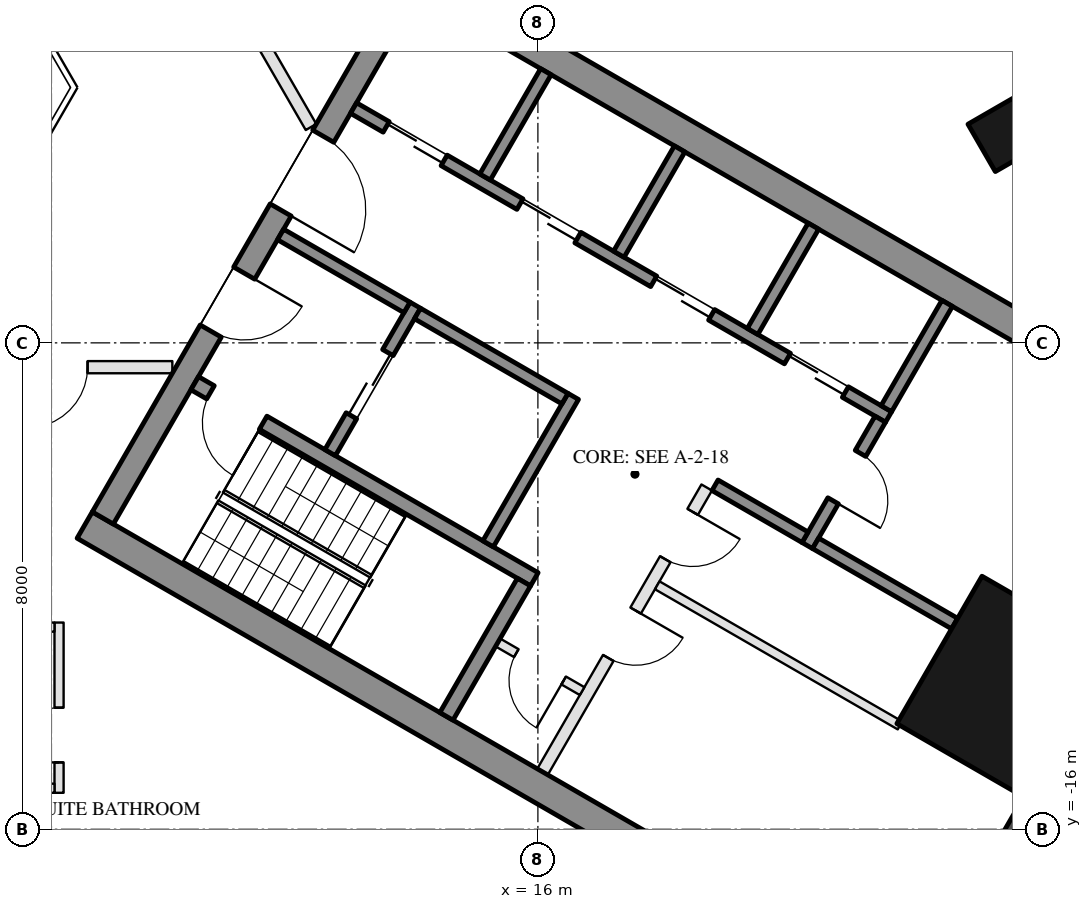
"""IFC4 building model, lengths in metres.
Left out: names, types, materials, properties, quantities, classifications, styles, units other than length and angle.
Written with IfcOpenShell. Run it as: python <this file> out.ifc"""

import sys

from ifc_helpers import new_model, si_unit, direction, frame, frame_2d, origin, origin_2d, place, context, subcontext, project, spatial, rectangle, hollow_rectangle, extrude, element, fill, save


model = new_model("IFC4")
c1 = context("Model", 3, precision=1e-05, world=origin(), true_north=direction((0.0, 1.0)))
c2 = subcontext(c1, "Body", "Model", "MODEL_VIEW")
j1 = project(units=[si_unit("LENGTHUNIT", "METRE"), si_unit("PLANEANGLEUNIT", "RADIAN")], contexts=[c1])
p1 = place(None, origin())
s1 = spatial("IfcSite", under=j1, at=p1, CompositionType="ELEMENT")
p2 = place(p1, origin())
s2 = spatial("IfcBuilding", under=s1, at=p2, CompositionType="ELEMENT")
p3 = place(p2, frame((0.0, 0.0, 87.2)))
s3 = spatial("IfcBuildingStorey", under=s2, at=p3, CompositionType="ELEMENT", Elevation=87.2)
p4 = place(p3, frame((23.688, -4.568, 0.0), z_axis=(0.0, 0.0, 1.0), x_axis=(-0.5, 0.866025403784, 0.0)))
e1 = element("IfcColumn", 1, at=p4, inside=s3, PredefinedType="COLUMN", context=c2, shape_type="SweptSolid", body=[
    extrude(hollow_rectangle(XDim=0.9, YDim=0.9, WallThickness=0.04, at=origin_2d()), origin(), (0.0, 0.0, 1.0), 3.7),
])
p5 = place(p3, frame((23.643, -13.65, 0.0), z_axis=(0.0, 0.0, 1.0), x_axis=(0.5, 0.866025403784, 0.0)))
e2 = element("IfcColumn", 2, at=p5, inside=s3, PredefinedType="COLUMN", context=c2, shape_type="SweptSolid", body=[
    extrude(hollow_rectangle(XDim=2.8, YDim=2.4, WallThickness=0.07, at=origin_2d()), origin(), (0.0, 0.0, 1.0), 3.7),
])
p6 = place(p3, frame((23.427, -16.792, 0.0), z_axis=(0.0, 0.0, 1.0), x_axis=(0.500018773155, 0.866014564827, 0.0)))
e3 = element("IfcWall", 3, at=p6, inside=s3, PredefinedType="SOLIDWALL", context=c2, shape_type="SweptSolid", body=[
    extrude(rectangle(XDim=5.658, YDim=0.35, at=frame_2d((2.829, 0.0))), origin(), (0.0, 0.0, 1.0), 3.55),
])
p7 = place(p3, frame((26.257, -6.567, 0.0), z_axis=(0.0, 0.0, 1.0), x_axis=(-0.500023526245, 0.866011820475, 0.0)))
e4 = element("IfcWall", 4, at=p7, inside=s3, PredefinedType="SOLIDWALL", context=c2, shape_type="SweptSolid", body=[
    extrude(rectangle(XDim=11.816, YDim=0.35, at=frame_2d((5.908, 0.0))), origin(), (0.0, 0.0, 1.0), 3.55),
])
p8 = place(p7, frame((0.38, 0.0, 0.3)))
e5 = element("IfcOpeningElement", 5, at=p8, cuts=e4, PredefinedType="OPENING", context=c2, shape_type="SweptSolid", body=[
    extrude(rectangle(XDim=1.8, YDim=2.65, at=frame_2d((0.9, 1.325))), frame((0.0, 0.185, 0.0), z_axis=(0.0, -1.0, 0.0), x_axis=(1.0, 0.0, 0.0)), (0.0, 0.0, 1.0), 0.37),
])
p9 = place(p7, frame((7.716, 0.0, 0.0)))
e6 = element("IfcOpeningElement", 6, at=p9, cuts=e4, PredefinedType="OPENING", context=c2, shape_type="SweptSolid", body=[
    extrude(rectangle(XDim=2.4, YDim=2.4, at=frame_2d((1.2, 1.2))), frame((0.0, 0.185, 0.0), z_axis=(0.0, -1.0, 0.0), x_axis=(1.0, 0.0, 0.0)), (0.0, 0.0, 1.0), 0.37),
])
p10 = place(p7, frame((3.816, 0.0, 0.3)))
e7 = element("IfcOpeningElement", 7, at=p10, cuts=e4, PredefinedType="OPENING", context=c2, shape_type="SweptSolid", body=[
    extrude(rectangle(XDim=1.6, YDim=2.65, at=frame_2d((0.8, 1.325))), frame((0.0, 0.185, 0.0), z_axis=(0.0, -1.0, 0.0), x_axis=(1.0, 0.0, 0.0)), (0.0, 0.0, 1.0), 0.37),
])
p11 = place(p7, frame((5.716, 0.0, 0.3)))
e8 = element("IfcOpeningElement", 8, at=p11, cuts=e4, PredefinedType="OPENING", context=c2, shape_type="SweptSolid", body=[
    extrude(rectangle(XDim=1.6, YDim=2.65, at=frame_2d((0.8, 1.325))), frame((0.0, 0.185, 0.0), z_axis=(0.0, -1.0, 0.0), x_axis=(1.0, 0.0, 0.0)), (0.0, 0.0, 1.0), 0.37),
])
for number, where, z_axis, x_axis in (
    (9, (8.547, -10.997, 0.0), (0.0, 0.0, 1.0), (0.866, -0.5, 0.0)),
    (10, (13.797, -1.903, 0.0), (0.0, 0.0, 1.0), (0.866, -0.5, 0.0)),
):
    element("IfcWall", number, at=place(p3, frame(where, z_axis=z_axis, x_axis=x_axis)), inside=s3, PredefinedType="SHEAR", context=c2, shape_type="SweptSolid", body=[
        extrude(rectangle(XDim=14.837, YDim=0.5, at=frame_2d((7.418, 0.0))), origin(), (0.0, 0.0, 1.0), 3.5),
    ])
p12 = place(p3, frame((8.845, -10.88, 0.0), z_axis=(0.0, 0.0, 1.0), x_axis=(0.500004234368, 0.866022959057, 0.0)))
e11 = element("IfcWall", 11, at=p12, inside=s3, PredefinedType="SHEAR", context=c2, shape_type="SweptSolid", body=[
    extrude(rectangle(XDim=10.0, YDim=0.4, at=frame_2d((5.0, 0.0))), origin(), (0.0, 0.0, 1.0), 3.5),
])
p13 = place(p12, frame((3.55, 0.0, 0.0)))
e12 = element("IfcOpeningElement", 12, at=p13, cuts=e11, PredefinedType="OPENING", context=c2, shape_type="SweptSolid", body=[
    extrude(rectangle(XDim=1.1, YDim=2.1, at=frame_2d((0.55, 1.05))), frame((0.0, 0.21, 0.0), z_axis=(0.0, -1.0, 0.0), x_axis=(1.0, 0.0, 0.0)), (0.0, 0.0, 1.0), 0.42),
])
p14 = place(p12, frame((5.85, 0.0, 0.0)))
e13 = element("IfcOpeningElement", 13, at=p14, cuts=e11, PredefinedType="OPENING", context=c2, shape_type="SweptSolid", body=[
    extrude(rectangle(XDim=1.4, YDim=2.1, at=frame_2d((0.7, 1.05))), frame((0.0, 0.21, 0.0), z_axis=(0.0, -1.0, 0.0), x_axis=(1.0, 0.0, 0.0)), (0.0, 0.0, 1.0), 0.42),
])
p15 = place(p3, frame((10.356, -8.664, 0.0), z_axis=(0.0, 0.0, 1.0), x_axis=(0.866028629588, -0.499994412703, 0.0)))
e14 = element("IfcWall", 14, at=p15, inside=s3, PredefinedType="SHEAR", context=c2, shape_type="SweptSolid", body=[
    extrude(rectangle(XDim=6.45, YDim=0.25, at=frame_2d((3.225, 0.0))), origin(), (0.0, 0.0, 1.0), 3.5),
])
p16 = place(p15, frame((0.3, 0.0, 0.0)))
e15 = element("IfcOpeningElement", 15, at=p16, cuts=e14, PredefinedType="OPENING", context=c2, shape_type="SweptSolid", body=[
    extrude(rectangle(XDim=1.0, YDim=2.1, at=frame_2d((0.5, 1.05))), frame((0.0, 0.135, 0.0), z_axis=(0.0, -1.0, 0.0), x_axis=(1.0, 0.0, 0.0)), (0.0, 0.0, 1.0), 0.27),
])
p17 = place(p3, frame((14.496, -14.143, 0.0), z_axis=(0.0, 0.0, 1.0), x_axis=(0.500062241894, 0.865989465428, 0.0)))
e16 = element("IfcWall", 16, at=p17, inside=s3, PredefinedType="SHEAR", context=c2, shape_type="SweptSolid", body=[
    extrude(rectangle(XDim=2.55, YDim=0.25, at=frame_2d((1.275, 0.0))), origin(), (0.0, 0.0, 1.0), 3.5),
])
p18 = place(p3, frame((15.181, -11.305, 0.0), z_axis=(0.0, 0.0, 1.0), x_axis=(0.49994636267, 0.866056369097, 0.0)))
e17 = element("IfcWall", 17, at=p18, inside=s3, PredefinedType="SHEAR", context=c2, shape_type="SweptSolid", body=[
    extrude(rectangle(XDim=2.8, YDim=0.2, at=frame_2d((1.4, 0.0))), origin(), (0.0, 0.0, 1.0), 3.5),
])
p19 = place(p3, frame((12.583, -9.805, 0.0), z_axis=(0.0, 0.0, 1.0), x_axis=(0.49994636267, 0.866056369097, 0.0)))
e18 = element("IfcWall", 18, at=p19, inside=s3, PredefinedType="SHEAR", context=c2, shape_type="SweptSolid", body=[
    extrude(rectangle(XDim=2.8, YDim=0.2, at=frame_2d((1.4, 0.0))), origin(), (0.0, 0.0, 1.0), 3.5),
])
p20 = place(p19, frame((0.7, 0.0, 0.0)))
e19 = element("IfcOpeningElement", 19, at=p20, cuts=e18, PredefinedType="OPENING", context=c2, shape_type="SweptSolid", body=[
    extrude(rectangle(XDim=1.2, YDim=2.1, at=frame_2d((0.6, 1.05))), frame((0.0, 0.11, 0.0), z_axis=(0.0, -1.0, 0.0), x_axis=(1.0, 0.0, 0.0)), (0.0, 0.0, 1.0), 0.22),
])
p21 = place(p3, frame((11.768, -6.217, 0.0), z_axis=(0.0, 0.0, 1.0), x_axis=(0.866050077142, -0.499957262057, 0.0)))
e20 = element("IfcWall", 20, at=p21, inside=s3, PredefinedType="SHEAR", context=c2, shape_type="SweptSolid", body=[
    extrude(rectangle(XDim=2.4, YDim=0.2, at=frame_2d((1.2, 0.0))), origin(), (0.0, 0.0, 1.0), 3.5),
])
p22 = place(p3, frame((14.02, -7.517, 0.0), z_axis=(0.0, 0.0, 1.0), x_axis=(0.866034573852, -0.49998411664, 0.0)))
e21 = element("IfcWall", 21, at=p22, inside=s3, PredefinedType="SHEAR", context=c2, shape_type="SweptSolid", body=[
    extrude(rectangle(XDim=2.8, YDim=0.2, at=frame_2d((1.4, 0.0))), origin(), (0.0, 0.0, 1.0), 3.5),
])
p23 = place(p3, frame((12.968, -4.138, 0.0), z_axis=(0.0, 0.0, 1.0), x_axis=(0.866028328073, -0.49999493495, 0.0)))
e22 = element("IfcWall", 22, at=p23, inside=s3, PredefinedType="SHEAR", context=c2, shape_type="SweptSolid", body=[
    extrude(rectangle(XDim=10.16, YDim=0.2, at=frame_2d((5.08, 0.0))), origin(), (0.0, 0.0, 1.0), 3.5),
])
p24 = place(p23, frame((0.62, 0.0, 0.0)))
e23 = element("IfcOpeningElement", 23, at=p24, cuts=e22, PredefinedType="OPENING", context=c2, shape_type="SweptSolid", body=[
    extrude(rectangle(XDim=1.1, YDim=2.1, at=frame_2d((0.55, 1.05))), frame((0.0, 0.11, 0.0), z_axis=(0.0, -1.0, 0.0), x_axis=(1.0, 0.0, 0.0)), (0.0, 0.0, 1.0), 0.22),
])
p25 = place(p23, frame((3.16, 0.0, 0.0)))
e24 = element("IfcOpeningElement", 24, at=p25, cuts=e22, PredefinedType="OPENING", context=c2, shape_type="SweptSolid", body=[
    extrude(rectangle(XDim=1.1, YDim=2.1, at=frame_2d((0.55, 1.05))), frame((0.0, 0.11, 0.0), z_axis=(0.0, -1.0, 0.0), x_axis=(1.0, 0.0, 0.0)), (0.0, 0.0, 1.0), 0.22),
])
p26 = place(p23, frame((5.7, 0.0, 0.0)))
e25 = element("IfcOpeningElement", 25, at=p26, cuts=e22, PredefinedType="OPENING", context=c2, shape_type="SweptSolid", body=[
    extrude(rectangle(XDim=1.1, YDim=2.1, at=frame_2d((0.55, 1.05))), frame((0.0, 0.11, 0.0), z_axis=(0.0, -1.0, 0.0), x_axis=(1.0, 0.0, 0.0)), (0.0, 0.0, 1.0), 0.22),
])
p27 = place(p23, frame((8.24, 0.0, 0.0)))
e26 = element("IfcOpeningElement", 26, at=p27, cuts=e22, PredefinedType="OPENING", context=c2, shape_type="SweptSolid", body=[
    extrude(rectangle(XDim=1.1, YDim=2.1, at=frame_2d((0.55, 1.05))), frame((0.0, 0.11, 0.0), z_axis=(0.0, -1.0, 0.0), x_axis=(1.0, 0.0, 0.0)), (0.0, 0.0, 1.0), 0.22),
])
p28 = place(p3, frame((20.43, -11.333, 0.0), z_axis=(0.0, 0.0, 1.0), x_axis=(0.500001309137, 0.866024647952, 0.0)))
e27 = element("IfcWall", 27, at=p28, inside=s3, PredefinedType="SHEAR", context=c2, shape_type="SweptSolid", body=[
    extrude(rectangle(XDim=2.4, YDim=0.2, at=frame_2d((1.2, 0.0))), origin(), (0.0, 0.0, 1.0), 3.5),
])
p29 = place(p28, frame((0.85, 0.0, 0.0)))
e28 = element("IfcOpeningElement", 28, at=p29, cuts=e27, PredefinedType="OPENING", context=c2, shape_type="SweptSolid", body=[
    extrude(rectangle(XDim=0.9, YDim=2.1, at=frame_2d((0.45, 1.05))), frame((0.0, 0.11, 0.0), z_axis=(0.0, -1.0, 0.0), x_axis=(1.0, 0.0, 0.0)), (0.0, 0.0, 1.0), 0.22),
])
p30 = place(p3, frame((18.913, -10.342, 0.0), z_axis=(0.0, 0.0, 1.0), x_axis=(0.866038183914, -0.499977863513, 0.0)))
e29 = element("IfcWall", 29, at=p30, inside=s3, PredefinedType="SHEAR", context=c2, shape_type="SweptSolid", body=[
    extrude(rectangle(XDim=1.71, YDim=0.2, at=frame_2d((0.855, 0.0))), origin(), (0.0, 0.0, 1.0), 3.5),
])
for number, where, z_axis, x_axis in (
    (30, (15.131, -5.272, 0.0), (0.0, 0.0, 1.0), (0.5, 0.866, 0.0)),
    (31, (17.331, -6.542, 0.0), (0.0, 0.0, 1.0), (0.5, 0.866, 0.0)),
    (32, (19.531, -7.812, 0.0), (0.0, 0.0, 1.0), (0.5, 0.866, 0.0)),
    (33, (21.73, -9.082, 0.0), (0.0, 0.0, 1.0), (0.5, 0.866, 0.0)),
):
    element("IfcWall", number, at=place(p3, frame(where, z_axis=z_axis, x_axis=x_axis)), inside=s3, PredefinedType="SHEAR", context=c2, shape_type="SweptSolid", body=[
        extrude(rectangle(XDim=2.0, YDim=0.2, at=frame_2d((1.0, 0.0))), origin(), (0.0, 0.0, 1.0), 3.5),
    ])
p31 = place(p3, frame((20.567, -11.297, 0.0), z_axis=(0.0, 0.0, 1.0), x_axis=(0.866060851709, -0.499938597367, 0.0)))
e34 = element("IfcWall", 34, at=p31, inside=s3, PredefinedType="SHEAR", context=c2, shape_type="SweptSolid", body=[
    extrude(rectangle(XDim=2.64, YDim=0.2, at=frame_2d((1.32, 0.0))), origin(), (0.0, 0.0, 1.0), 3.5),
])
p32 = place(p3, frame((16.076, -15.055, 0.0), z_axis=(0.0, 0.0, 1.0), x_axis=(0.499995103361, 0.866028230842, 0.0)))
e35 = element("IfcWall", 35, at=p32, inside=s3, PredefinedType="PARTITIONING", context=c2, shape_type="SweptSolid", body=[
    extrude(rectangle(XDim=5.4, YDim=0.2, at=frame_2d((2.7, 0.0))), origin(), (0.0, 0.0, 1.0), 3.5),
])
p33 = place(p32, frame((2.163, 0.0, 0.0)))
e36 = element("IfcOpeningElement", 36, at=p33, cuts=e35, PredefinedType="OPENING", context=c2, shape_type="SweptSolid", body=[
    extrude(rectangle(XDim=0.9, YDim=2.1, at=frame_2d((0.45, 1.05))), frame((0.0, 0.11, 0.0), z_axis=(0.0, -1.0, 0.0), x_axis=(1.0, 0.0, 0.0)), (0.0, 0.0, 1.0), 0.22),
])
p34 = place(p32, frame((4.038, 0.0, 0.0)))
e37 = element("IfcOpeningElement", 37, at=p34, cuts=e35, PredefinedType="OPENING", context=c2, shape_type="SweptSolid", body=[
    extrude(rectangle(XDim=0.9, YDim=2.1, at=frame_2d((0.45, 1.05))), frame((0.0, 0.11, 0.0), z_axis=(0.0, -1.0, 0.0), x_axis=(1.0, 0.0, 0.0)), (0.0, 0.0, 1.0), 0.22),
])
p35 = place(p3, frame((15.342, -12.928, 0.0), z_axis=(0.0, 0.0, 1.0), x_axis=(0.865989903783, -0.500061482766, 0.0)))
e38 = element("IfcWall", 38, at=p35, inside=s3, PredefinedType="PARTITIONING", context=c2, shape_type="SweptSolid", body=[
    extrude(rectangle(XDim=1.6, YDim=0.15, at=frame_2d((0.8, 0.0))), origin(), (0.0, 0.0, 1.0), 3.5),
])
p36 = place(p35, frame((0.35, 0.0, 0.0)))
e39 = element("IfcOpeningElement", 39, at=p36, cuts=e38, PredefinedType="OPENING", context=c2, shape_type="SweptSolid", body=[
    extrude(rectangle(XDim=0.9, YDim=2.1, at=frame_2d((0.45, 1.05))), frame((0.0, 0.085, 0.0), z_axis=(0.0, -1.0, 0.0), x_axis=(1.0, 0.0, 0.0)), (0.0, 0.0, 1.0), 0.17),
])
p37 = place(p3, frame((17.963, -11.987, 0.0), z_axis=(0.0, 0.0, 1.0), x_axis=(0.865998608524, -0.500046407882, 0.0)))
e40 = element("IfcWall", 40, at=p37, inside=s3, PredefinedType="PARTITIONING", context=c2, shape_type="SweptSolid", body=[
    extrude(rectangle(XDim=4.61, YDim=0.15, at=frame_2d((2.305, 0.0))), origin(), (0.0, 0.0, 1.0), 3.5),
])
p38 = place(p3, frame((9.988, -8.4, 0.0), z_axis=(0.0, 0.0, 1.0), x_axis=(-1.0, 0.0, 0.0)))
e41 = element("IfcWall", 41, at=p38, inside=s3, PredefinedType="PARTITIONING", context=c2, shape_type="SweptSolid", body=[
    extrude(rectangle(XDim=3.788, YDim=0.2, at=frame_2d((1.894, 0.0))), origin(), (0.0, 0.0, 1.0), 2.95),
])
p39 = place(p38, frame((1.394, 0.0, 0.0)))
e42 = element("IfcOpeningElement", 42, at=p39, cuts=e41, PredefinedType="OPENING", context=c2, shape_type="SweptSolid", body=[
    extrude(rectangle(XDim=1.0, YDim=2.1, at=frame_2d((0.5, 1.05))), frame((0.0, 0.11, 0.0), z_axis=(0.0, -1.0, 0.0), x_axis=(1.0, 0.0, 0.0)), (0.0, 0.0, 1.0), 0.22),
])
p40 = place(p3, frame((8.125, -15.4, 0.0), z_axis=(0.0, 0.0, 1.0), x_axis=(0.0, 1.0, 0.0)))
e43 = element("IfcWall", 43, at=p40, inside=s3, PredefinedType="PARTITIONING", context=c2, shape_type="SweptSolid", body=[
    extrude(rectangle(XDim=2.8, YDim=0.15, at=frame_2d((1.4, 0.0))), origin(), (0.0, 0.0, 1.0), 3.55),
])
p41 = place(p40, frame((0.5, 0.0, 0.0)))
e44 = element("IfcOpeningElement", 44, at=p41, cuts=e43, PredefinedType="OPENING", context=c2, shape_type="SweptSolid", body=[
    extrude(rectangle(XDim=0.9, YDim=2.1, at=frame_2d((0.45, 1.05))), frame((0.0, 0.085, 0.0), z_axis=(0.0, -1.0, 0.0), x_axis=(1.0, 0.0, 0.0)), (0.0, 0.0, 1.0), 0.17),
])
for number, where, z_axis, x_axis in (
    (45, (6.2, -15.325, 0.0), (0.0, 0.0, 1.0), (1.0, 0.0, 0.0)),
    (46, (6.2, -12.675, 0.0), (0.0, 0.0, 1.0), (1.0, 0.0, 0.0)),
):
    element("IfcWall", number, at=place(p3, frame(where, z_axis=z_axis, x_axis=x_axis)), inside=s3, PredefinedType="PARTITIONING", context=c2, shape_type="SweptSolid", body=[
        extrude(rectangle(XDim=1.85, YDim=0.15, at=frame_2d((0.925, 0.0))), origin(), (0.0, 0.0, 1.0), 2.95),
    ])
p42 = place(p3, frame((9.625, 0.13, 0.0), z_axis=(0.0, 0.0, 1.0), x_axis=(0.500036828865, -0.866004139585, 0.0)))
e47 = element("IfcWall", 47, at=p42, inside=s3, PredefinedType="PARTITIONING", context=c2, shape_type="SweptSolid", body=[
    extrude(rectangle(XDim=5.288, YDim=0.2, at=frame_2d((2.644, 0.0))), origin(), (0.0, 0.0, 1.0), 2.95),
])
p43 = place(p42, frame((2.144, 0.0, 0.0)))
e48 = element("IfcOpeningElement", 48, at=p43, cuts=e47, PredefinedType="OPENING", context=c2, shape_type="SweptSolid", body=[
    extrude(rectangle(XDim=1.0, YDim=2.1, at=frame_2d((0.5, 1.05))), frame((0.0, 0.11, 0.0), z_axis=(0.0, -1.0, 0.0), x_axis=(1.0, 0.0, 0.0)), (0.0, 0.0, 1.0), 0.22),
])
p44 = place(p10, origin())
e49 = element("IfcWindow", 49, at=p44, inside=s3, PartitioningType="SINGLE_PANEL", PredefinedType="WINDOW", context=c2, shape_type="SweptSolid", body=[
    extrude(rectangle(XDim=1.6, YDim=2.65, at=frame_2d((0.8, 1.325))), frame((0.0, 0.03, 0.0), z_axis=(0.0, -1.0, 0.0), x_axis=(1.0, 0.0, 0.0)), (0.0, 0.0, 1.0), 0.06),
])
fill(e7, e49)
p45 = place(p20, origin())
e50 = element("IfcDoor", 50, at=p45, inside=s3, OperationType="DOUBLE_DOOR_SLIDING", PredefinedType="DOOR", context=c2, shape_type="SweptSolid", body=[
    extrude(rectangle(XDim=1.2, YDim=2.1, at=frame_2d((0.6, 1.05))), frame((0.0, 0.025, 0.0), z_axis=(0.0, -1.0, 0.0), x_axis=(1.0, 0.0, 0.0)), (0.0, 0.0, 1.0), 0.05),
])
fill(e19, e50)
p46 = place(p36, frame((0.9, 0.0, 0.0), z_axis=(0.0, 0.0, 1.0), x_axis=(-1.0, 0.0, 0.0)))
e51 = element("IfcDoor", 51, at=p46, inside=s3, OperationType="SINGLE_SWING_LEFT", PredefinedType="DOOR", context=c2, shape_type="SweptSolid", body=[
    extrude(rectangle(XDim=0.9, YDim=2.1, at=frame_2d((0.45, 1.05))), frame((0.0, 0.025, 0.0), z_axis=(0.0, -1.0, 0.0), x_axis=(1.0, 0.0, 0.0)), (0.0, 0.0, 1.0), 0.05),
])
fill(e39, e51)
p47 = place(p24, origin())
e52 = element("IfcDoor", 52, at=p47, inside=s3, OperationType="DOUBLE_DOOR_SLIDING", PredefinedType="DOOR", context=c2, shape_type="SweptSolid", body=[
    extrude(rectangle(XDim=1.1, YDim=2.1, at=frame_2d((0.55, 1.05))), frame((0.0, 0.025, 0.0), z_axis=(0.0, -1.0, 0.0), x_axis=(1.0, 0.0, 0.0)), (0.0, 0.0, 1.0), 0.05),
])
fill(e23, e52)
p48 = place(p25, origin())
e53 = element("IfcDoor", 53, at=p48, inside=s3, OperationType="DOUBLE_DOOR_SLIDING", PredefinedType="DOOR", context=c2, shape_type="SweptSolid", body=[
    extrude(rectangle(XDim=1.1, YDim=2.1, at=frame_2d((0.55, 1.05))), frame((0.0, 0.025, 0.0), z_axis=(0.0, -1.0, 0.0), x_axis=(1.0, 0.0, 0.0)), (0.0, 0.0, 1.0), 0.05),
])
fill(e24, e53)
p49 = place(p26, origin())
e54 = element("IfcDoor", 54, at=p49, inside=s3, OperationType="DOUBLE_DOOR_SLIDING", PredefinedType="DOOR", context=c2, shape_type="SweptSolid", body=[
    extrude(rectangle(XDim=1.1, YDim=2.1, at=frame_2d((0.55, 1.05))), frame((0.0, 0.025, 0.0), z_axis=(0.0, -1.0, 0.0), x_axis=(1.0, 0.0, 0.0)), (0.0, 0.0, 1.0), 0.05),
])
fill(e25, e54)
p50 = place(p27, origin())
e55 = element("IfcDoor", 55, at=p50, inside=s3, OperationType="DOUBLE_DOOR_SLIDING", PredefinedType="DOOR", context=c2, shape_type="SweptSolid", body=[
    extrude(rectangle(XDim=1.1, YDim=2.1, at=frame_2d((0.55, 1.05))), frame((0.0, 0.025, 0.0), z_axis=(0.0, -1.0, 0.0), x_axis=(1.0, 0.0, 0.0)), (0.0, 0.0, 1.0), 0.05),
])
fill(e26, e55)
p51 = place(p29, frame((0.9, 0.0, 0.0), z_axis=(0.0, 0.0, 1.0), x_axis=(-1.0, 0.0, 0.0)))
e56 = element("IfcDoor", 56, at=p51, inside=s3, OperationType="SINGLE_SWING_RIGHT", PredefinedType="DOOR", context=c2, shape_type="SweptSolid", body=[
    extrude(rectangle(XDim=0.9, YDim=2.1, at=frame_2d((0.45, 1.05))), frame((0.0, 0.025, 0.0), z_axis=(0.0, -1.0, 0.0), x_axis=(1.0, 0.0, 0.0)), (0.0, 0.0, 1.0), 0.05),
])
fill(e28, e56)
p52 = place(p33, frame((0.9, 0.0, 0.0), z_axis=(0.0, 0.0, 1.0), x_axis=(-1.0, 0.0, 0.0)))
e57 = element("IfcDoor", 57, at=p52, inside=s3, OperationType="SINGLE_SWING_LEFT", PredefinedType="DOOR", context=c2, shape_type="SweptSolid", body=[
    extrude(rectangle(XDim=0.9, YDim=2.1, at=frame_2d((0.45, 1.05))), frame((0.0, 0.025, 0.0), z_axis=(0.0, -1.0, 0.0), x_axis=(1.0, 0.0, 0.0)), (0.0, 0.0, 1.0), 0.05),
])
fill(e36, e57)
p53 = place(p34, frame((0.9, 0.0, 0.0), z_axis=(0.0, 0.0, 1.0), x_axis=(-1.0, 0.0, 0.0)))
e58 = element("IfcDoor", 58, at=p53, inside=s3, OperationType="SINGLE_SWING_LEFT", PredefinedType="DOOR", context=c2, shape_type="SweptSolid", body=[
    extrude(rectangle(XDim=0.9, YDim=2.1, at=frame_2d((0.45, 1.05))), frame((0.0, 0.025, 0.0), z_axis=(0.0, -1.0, 0.0), x_axis=(1.0, 0.0, 0.0)), (0.0, 0.0, 1.0), 0.05),
])
fill(e37, e58)
p54 = place(p13, frame((1.1, 0.0, 0.0), z_axis=(0.0, 0.0, 1.0), x_axis=(-1.0, 0.0, 0.0)))
e59 = element("IfcDoor", 59, at=p54, inside=s3, OperationType="SINGLE_SWING_LEFT", PredefinedType="DOOR", context=c2, shape_type="SweptSolid", body=[
    extrude(rectangle(XDim=1.1, YDim=2.1, at=frame_2d((0.55, 1.05))), frame((0.0, 0.025, 0.0), z_axis=(0.0, -1.0, 0.0), x_axis=(1.0, 0.0, 0.0)), (0.0, 0.0, 1.0), 0.05),
])
fill(e12, e59)
p55 = place(p14, frame((1.4, 0.0, 0.0), z_axis=(0.0, 0.0, 1.0), x_axis=(-1.0, 0.0, 0.0)))
e60 = element("IfcDoor", 60, at=p55, inside=s3, OperationType="DOUBLE_DOOR_SINGLE_SWING", PredefinedType="DOOR", context=c2, shape_type="SweptSolid", body=[
    extrude(rectangle(XDim=1.4, YDim=2.1, at=frame_2d((0.7, 1.05))), frame((0.0, 0.025, 0.0), z_axis=(0.0, -1.0, 0.0), x_axis=(1.0, 0.0, 0.0)), (0.0, 0.0, 1.0), 0.05),
])
fill(e13, e60)
p56 = place(p16, frame((1.0, 0.0, 0.0), z_axis=(0.0, 0.0, 1.0), x_axis=(-1.0, 0.0, 0.0)))
e61 = element("IfcDoor", 61, at=p56, inside=s3, OperationType="SINGLE_SWING_LEFT", PredefinedType="DOOR", context=c2, shape_type="SweptSolid", body=[
    extrude(rectangle(XDim=1.0, YDim=2.1, at=frame_2d((0.5, 1.05))), frame((0.0, 0.025, 0.0), z_axis=(0.0, -1.0, 0.0), x_axis=(1.0, 0.0, 0.0)), (0.0, 0.0, 1.0), 0.05),
])
fill(e15, e61)
p57 = place(p41, origin())
e62 = element("IfcDoor", 62, at=p57, inside=s3, OperationType="SINGLE_SWING_LEFT", PredefinedType="DOOR", context=c2, shape_type="SweptSolid", body=[
    extrude(rectangle(XDim=0.9, YDim=2.1, at=frame_2d((0.45, 1.05))), frame((0.0, 0.025, 0.0), z_axis=(0.0, -1.0, 0.0), x_axis=(1.0, 0.0, 0.0)), (0.0, 0.0, 1.0), 0.05),
])
fill(e44, e62)
p58 = place(p39, origin())
e63 = element("IfcDoor", 63, at=p58, inside=s3, OperationType="SINGLE_SWING_RIGHT", PredefinedType="DOOR", context=c2, shape_type="SweptSolid", body=[
    extrude(rectangle(XDim=1.0, YDim=2.1, at=frame_2d((0.5, 1.05))), frame((0.0, 0.025, 0.0), z_axis=(0.0, -1.0, 0.0), x_axis=(1.0, 0.0, 0.0)), (0.0, 0.0, 1.0), 0.05),
])
fill(e42, e63)
save(model, sys.argv[1])
